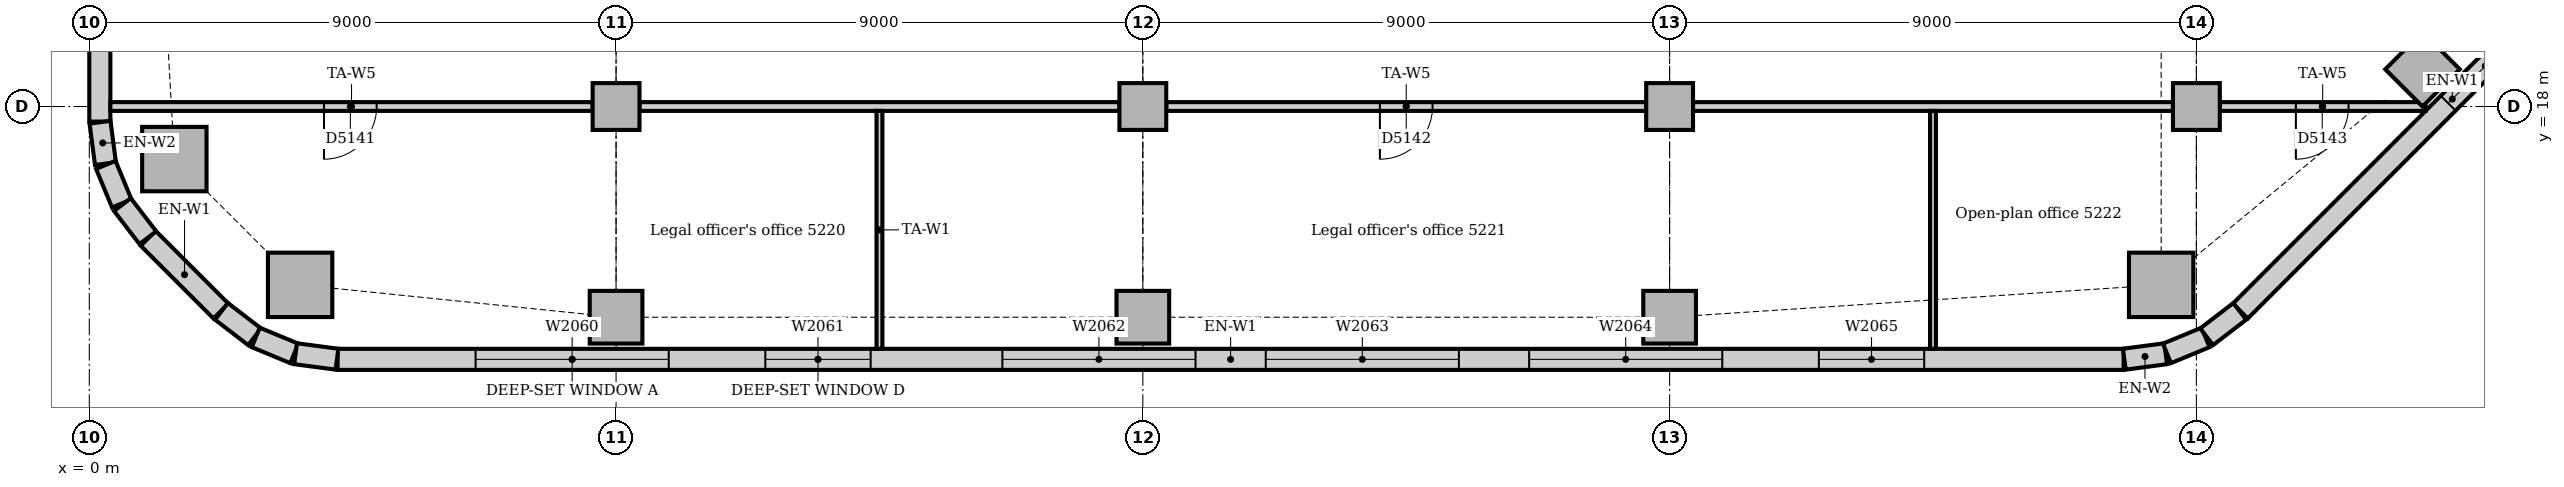
"""IFC4 building model, lengths in metres.
Left out: names, types, materials, properties, quantities, classifications, styles, units other than length and angle.
Written with IfcOpenShell. Run it as: python <this file> out.ifc"""

import sys

from ifc_helpers import new_model, si_unit, direction, frame, frame_2d, origin, origin_2d, place, context, subcontext, project, spatial, rectangle, extrude, element, fill, save


model = new_model("IFC4")
c1 = context("Model", 3, precision=1e-05, world=origin(), true_north=direction((0.0, 1.0)))
c2 = subcontext(c1, "Body", "Model", "MODEL_VIEW")
j1 = project(units=[si_unit("LENGTHUNIT", "METRE"), si_unit("PLANEANGLEUNIT", "RADIAN")], contexts=[c1])
p1 = place(None, origin())
s1 = spatial("IfcSite", under=j1, at=p1, CompositionType="ELEMENT")
p2 = place(p1, origin())
s2 = spatial("IfcBuilding", under=s1, at=p2, CompositionType="ELEMENT")
p3 = place(p2, frame((0.0, 0.0, 218.0)))
s3 = spatial("IfcBuildingStorey", under=s2, at=p3, CompositionType="ELEMENT", Elevation=218.0)
for number, where, z_axis, x_axis in (
    (1, (3.602, 14.953, 0.0), (0.0, 0.0, 1.0), (1.0, 0.0, 0.0)),
    (2, (35.398, 14.953, 0.0), (0.0, 0.0, 1.0), (1.0, 0.0, 0.0)),
    (3, (1.453, 17.102, 0.0), (0.0, 0.0, 1.0), (1.0, 0.0, 0.0)),
):
    element("IfcColumn", number, at=place(p3, frame(where, z_axis=z_axis, x_axis=x_axis)), inside=s3, PredefinedType="COLUMN", context=c2, shape_type="SweptSolid", body=[
        extrude(rectangle(XDim=1.1, YDim=1.1, at=origin_2d()), origin(), (0.0, 0.0, 1.0), 3.85),
    ])
for number, where, z_axis, x_axis in (
    (4, (9.0, 14.4, 0.0), (0.0, 0.0, 1.0), (1.0, 0.0, 0.0)),
    (5, (18.0, 14.4, 0.0), (0.0, 0.0, 1.0), (1.0, 0.0, 0.0)),
    (6, (27.0, 14.4, 0.0), (0.0, 0.0, 1.0), (1.0, 0.0, 0.0)),
    (7, (39.864, 18.636, 0.0), (0.0, 0.0, 1.0), (0.707, 0.707, 0.0)),
):
    element("IfcColumn", number, at=place(p3, frame(where, z_axis=z_axis, x_axis=x_axis)), inside=s3, PredefinedType="COLUMN", context=c2, shape_type="SweptSolid", body=[
        extrude(rectangle(XDim=0.9, YDim=0.9, at=origin_2d()), origin(), (0.0, 0.0, 1.0), 3.85),
    ])
for number, where, z_axis, x_axis in (
    (8, (9.0, 18.0, 0.0), (0.0, 0.0, 1.0), (1.0, 0.0, 0.0)),
    (9, (18.0, 18.0, 0.0), (0.0, 0.0, 1.0), (1.0, 0.0, 0.0)),
    (10, (27.0, 18.0, 0.0), (0.0, 0.0, 1.0), (1.0, 0.0, 0.0)),
    (11, (36.0, 18.0, 0.0), (0.0, 0.0, 1.0), (1.0, 0.0, 0.0)),
):
    element("IfcColumn", number, at=place(p3, frame(where, z_axis=z_axis, x_axis=x_axis)), inside=s3, PredefinedType="COLUMN", context=c2, shape_type="SweptSolid", body=[
        extrude(rectangle(XDim=0.8, YDim=0.8, at=origin_2d()), origin(), (0.0, 0.0, 1.0), 3.85),
    ])
p4 = place(p3, frame((4.243, 13.68, 0.0), z_axis=(0.0, 0.0, 1.0), x_axis=(1.0, 0.0, 0.0)))
e12 = element("IfcWall", 12, at=p4, inside=s3, PredefinedType="STANDARD", context=c2, shape_type="SweptSolid", body=[
    extrude(rectangle(XDim=30.515, YDim=0.36, at=frame_2d((15.257, 0.0))), origin(), (0.0, 0.0, 1.0), 3.85),
])
p5 = place(p4, frame((2.357, 0.0, 0.9)))
e13 = element("IfcOpeningElement", 13, at=p5, cuts=e12, PredefinedType="OPENING", context=c2, shape_type="SweptSolid", body=[
    extrude(rectangle(XDim=3.3, YDim=1.6, at=frame_2d((1.65, 0.8))), frame((0.0, 0.19, 0.0), z_axis=(0.0, -1.0, 0.0), x_axis=(1.0, 0.0, 0.0)), (0.0, 0.0, 1.0), 0.38),
])
p6 = place(p4, frame((7.307, 0.0, 0.9)))
e14 = element("IfcOpeningElement", 14, at=p6, cuts=e12, PredefinedType="OPENING", context=c2, shape_type="SweptSolid", body=[
    extrude(rectangle(XDim=1.8, YDim=1.6, at=frame_2d((0.9, 0.8))), frame((0.0, 0.19, 0.0), z_axis=(0.0, -1.0, 0.0), x_axis=(1.0, 0.0, 0.0)), (0.0, 0.0, 1.0), 0.38),
])
p7 = place(p4, frame((11.357, 0.0, 0.9)))
e15 = element("IfcOpeningElement", 15, at=p7, cuts=e12, PredefinedType="OPENING", context=c2, shape_type="SweptSolid", body=[
    extrude(rectangle(XDim=3.3, YDim=1.6, at=frame_2d((1.65, 0.8))), frame((0.0, 0.19, 0.0), z_axis=(0.0, -1.0, 0.0), x_axis=(1.0, 0.0, 0.0)), (0.0, 0.0, 1.0), 0.38),
])
p8 = place(p4, frame((15.857, 0.0, 0.9)))
e16 = element("IfcOpeningElement", 16, at=p8, cuts=e12, PredefinedType="OPENING", context=c2, shape_type="SweptSolid", body=[
    extrude(rectangle(XDim=3.3, YDim=1.6, at=frame_2d((1.65, 0.8))), frame((0.0, 0.19, 0.0), z_axis=(0.0, -1.0, 0.0), x_axis=(1.0, 0.0, 0.0)), (0.0, 0.0, 1.0), 0.38),
])
p9 = place(p4, frame((20.357, 0.0, 0.9)))
e17 = element("IfcOpeningElement", 17, at=p9, cuts=e12, PredefinedType="OPENING", context=c2, shape_type="SweptSolid", body=[
    extrude(rectangle(XDim=3.3, YDim=1.6, at=frame_2d((1.65, 0.8))), frame((0.0, 0.19, 0.0), z_axis=(0.0, -1.0, 0.0), x_axis=(1.0, 0.0, 0.0)), (0.0, 0.0, 1.0), 0.38),
])
p10 = place(p4, frame((25.307, 0.0, 0.9)))
e18 = element("IfcOpeningElement", 18, at=p10, cuts=e12, PredefinedType="OPENING", context=c2, shape_type="SweptSolid", body=[
    extrude(rectangle(XDim=1.8, YDim=1.6, at=frame_2d((0.9, 0.8))), frame((0.0, 0.19, 0.0), z_axis=(0.0, -1.0, 0.0), x_axis=(1.0, 0.0, 0.0)), (0.0, 0.0, 1.0), 0.38),
])
p11 = place(p3, frame((36.751, 14.506, 0.0), z_axis=(0.0, 0.0, 1.0), x_axis=(0.707106781187, 0.707106781187, 0.0)))
e19 = element("IfcWall", 19, at=p11, inside=s3, PredefinedType="STANDARD", context=c2, shape_type="SweptSolid", body=[
    extrude(rectangle(XDim=10.243, YDim=0.36, at=frame_2d((5.121, 0.0))), origin(), (0.0, 0.0, 1.0), 3.85),
])
p12 = place(p11, frame((5.021, 0.0, 0.9)))
e20 = element("IfcOpeningElement", 20, at=p12, cuts=e19, PredefinedType="OPENING", context=c2, shape_type="SweptSolid", body=[
    extrude(rectangle(XDim=1.8, YDim=1.6, at=frame_2d((0.9, 0.8))), frame((0.0, 0.19, 0.0), z_axis=(0.0, -1.0, 0.0), x_axis=(1.0, 0.0, 0.0)), (0.0, 0.0, 1.0), 0.38),
])
p13 = place(p3, frame((0.18, 21.0, 0.0), z_axis=(0.0, 0.0, 1.0), x_axis=(0.0, -1.0, 0.0)))
e21 = element("IfcWall", 21, at=p13, inside=s3, PredefinedType="STANDARD", context=c2, shape_type="SweptSolid", body=[
    extrude(rectangle(XDim=3.257, YDim=0.36, at=frame_2d((1.629, 0.0))), origin(), (0.0, 0.0, 1.0), 3.85),
])
p14 = place(p3, frame((1.006, 15.749, 0.0), z_axis=(0.0, 0.0, 1.0), x_axis=(0.707106781187, -0.707106781187, 0.0)))
e22 = element("IfcWall", 22, at=p14, inside=s3, PredefinedType="STANDARD", context=c2, shape_type="SweptSolid", body=[
    extrude(rectangle(XDim=1.757, YDim=0.36, at=frame_2d((0.879, 0.0))), origin(), (0.0, 0.0, 1.0), 3.85),
])
for number, where, z_axis, x_axis in (
    (23, (34.769, 13.683, 0.0), (0.0, 0.0, 1.0), (0.991, 0.131, 0.0)),
    (24, (35.497, 13.782, 0.0), (0.0, 0.0, 1.0), (0.924, 0.383, 0.0)),
):
    element("IfcWall", number, at=place(p3, frame(where, z_axis=z_axis, x_axis=x_axis)), inside=s3, PredefinedType="STANDARD", context=c2, shape_type="SweptSolid", body=[
        extrude(rectangle(XDim=0.713, YDim=0.36, at=frame_2d((0.356, 0.0))), origin(), (0.0, 0.0, 1.0), 3.85),
    ])
p15 = place(p3, frame((36.175, 14.066, 0.0), z_axis=(0.0, 0.0, 1.0), x_axis=(0.793321924995, 0.608802368033, 0.0)))
e25 = element("IfcWall", 25, at=p15, inside=s3, PredefinedType="STANDARD", context=c2, shape_type="SweptSolid", body=[
    extrude(rectangle(XDim=0.713, YDim=0.36, at=frame_2d((0.357, 0.0))), origin(), (0.0, 0.0, 1.0), 3.85),
])
for number, where, z_axis, x_axis in (
    (26, (0.183, 17.731, 0.0), (0.0, 0.0, 1.0), (0.131, -0.991, 0.0)),
    (27, (0.282, 17.003, 0.0), (0.0, 0.0, 1.0), (0.383, -0.924, 0.0)),
):
    element("IfcWall", number, at=place(p3, frame(where, z_axis=z_axis, x_axis=x_axis)), inside=s3, PredefinedType="STANDARD", context=c2, shape_type="SweptSolid", body=[
        extrude(rectangle(XDim=0.713, YDim=0.36, at=frame_2d((0.356, 0.0))), origin(), (0.0, 0.0, 1.0), 3.85),
    ])
for number, where, z_axis, x_axis in (
    (28, (0.566, 16.325, 0.0), (0.0, 0.0, 1.0), (0.609, -0.793, 0.0)),
    (29, (2.259, 14.5, 0.0), (0.0, 0.0, 1.0), (0.793, -0.609, 0.0)),
):
    element("IfcWall", number, at=place(p3, frame(where, z_axis=z_axis, x_axis=x_axis)), inside=s3, PredefinedType="STANDARD", context=c2, shape_type="SweptSolid", body=[
        extrude(rectangle(XDim=0.713, YDim=0.36, at=frame_2d((0.357, 0.0))), origin(), (0.0, 0.0, 1.0), 3.85),
    ])
for number, where, z_axis, x_axis in (
    (30, (2.844, 14.055, 0.0), (0.0, 0.0, 1.0), (0.924, -0.383, 0.0)),
    (31, (3.524, 13.776, 0.0), (0.0, 0.0, 1.0), (0.991, -0.131, 0.0)),
):
    element("IfcWall", number, at=place(p3, frame(where, z_axis=z_axis, x_axis=x_axis)), inside=s3, PredefinedType="STANDARD", context=c2, shape_type="SweptSolid", body=[
        extrude(rectangle(XDim=0.713, YDim=0.36, at=frame_2d((0.356, 0.0))), origin(), (0.0, 0.0, 1.0), 3.85),
    ])
p16 = place(p3, frame((36.4, 18.0, 0.0), z_axis=(0.0, 0.0, 1.0), x_axis=(1.0, 0.0, 0.0)))
e32 = element("IfcWall", 32, at=p16, inside=s3, PredefinedType="PARTITIONING", context=c2, shape_type="SweptSolid", body=[
    extrude(rectangle(XDim=3.516, YDim=0.15, at=frame_2d((1.758, 0.0))), origin(), (0.0, 0.0, 1.0), 3.602),
])
p17 = place(p16, frame((1.3, 0.0, 0.0)))
e33 = element("IfcOpeningElement", 33, at=p17, cuts=e32, PredefinedType="OPENING", context=c2, shape_type="SweptSolid", body=[
    extrude(rectangle(XDim=0.9, YDim=2.1, at=frame_2d((0.45, 1.05))), frame((0.0, 0.085, 0.0), z_axis=(0.0, -1.0, 0.0), x_axis=(1.0, 0.0, 0.0)), (0.0, 0.0, 1.0), 0.17),
])
p18 = place(p3, frame((27.4, 18.0, 0.0), z_axis=(0.0, 0.0, 1.0), x_axis=(1.0, 0.0, 0.0)))
e34 = element("IfcWall", 34, at=p18, inside=s3, PredefinedType="PARTITIONING", context=c2, shape_type="SweptSolid", body=[
    extrude(rectangle(XDim=8.2, YDim=0.15, at=frame_2d((4.1, 0.0))), origin(), (0.0, 0.0, 1.0), 3.254),
])
p19 = place(p3, frame((18.4, 18.0, 0.0), z_axis=(0.0, 0.0, 1.0), x_axis=(1.0, 0.0, 0.0)))
e35 = element("IfcWall", 35, at=p19, inside=s3, PredefinedType="PARTITIONING", context=c2, shape_type="SweptSolid", body=[
    extrude(rectangle(XDim=8.2, YDim=0.15, at=frame_2d((4.1, 0.0))), origin(), (0.0, 0.0, 1.0), 3.254),
])
p20 = place(p19, frame((3.65, 0.0, 0.0)))
e36 = element("IfcOpeningElement", 36, at=p20, cuts=e35, PredefinedType="OPENING", context=c2, shape_type="SweptSolid", body=[
    extrude(rectangle(XDim=0.9, YDim=2.1, at=frame_2d((0.45, 1.05))), frame((0.0, 0.085, 0.0), z_axis=(0.0, -1.0, 0.0), x_axis=(1.0, 0.0, 0.0)), (0.0, 0.0, 1.0), 0.17),
])
p21 = place(p3, frame((9.4, 18.0, 0.0), z_axis=(0.0, 0.0, 1.0), x_axis=(1.0, 0.0, 0.0)))
e37 = element("IfcWall", 37, at=p21, inside=s3, PredefinedType="PARTITIONING", context=c2, shape_type="SweptSolid", body=[
    extrude(rectangle(XDim=8.2, YDim=0.15, at=frame_2d((4.1, 0.0))), origin(), (0.0, 0.0, 1.0), 3.254),
])
p22 = place(p3, frame((0.36, 18.0, 0.0), z_axis=(0.0, 0.0, 1.0), x_axis=(1.0, 0.0, 0.0)))
e38 = element("IfcWall", 38, at=p22, inside=s3, PredefinedType="PARTITIONING", context=c2, shape_type="SweptSolid", body=[
    extrude(rectangle(XDim=8.24, YDim=0.15, at=frame_2d((4.12, 0.0))), origin(), (0.0, 0.0, 1.0), 3.254),
])
p23 = place(p22, frame((3.65, 0.0, 0.0)))
e39 = element("IfcOpeningElement", 39, at=p23, cuts=e38, PredefinedType="OPENING", context=c2, shape_type="SweptSolid", body=[
    extrude(rectangle(XDim=0.9, YDim=2.1, at=frame_2d((0.45, 1.05))), frame((0.0, 0.085, 0.0), z_axis=(0.0, -1.0, 0.0), x_axis=(1.0, 0.0, 0.0)), (0.0, 0.0, 1.0), 0.17),
])
for number, where, z_axis, x_axis in (
    (40, (13.5, 13.86, 0.0), (0.0, 0.0, 1.0), (0.0, 1.0, 0.0)),
    (41, (31.5, 13.86, 0.0), (0.0, 0.0, 1.0), (0.0, 1.0, 0.0)),
):
    element("IfcWall", number, at=place(p3, frame(where, z_axis=z_axis, x_axis=x_axis)), inside=s3, PredefinedType="PARTITIONING", context=c2, shape_type="SweptSolid", body=[
        extrude(rectangle(XDim=4.065, YDim=0.1, at=frame_2d((2.033, 0.0))), origin(), (0.0, 0.0, 1.0), 3.85),
    ])
p24 = place(p5, origin())
e42 = element("IfcWindow", 42, at=p24, inside=s3, PartitioningType="SINGLE_PANEL", PredefinedType="WINDOW", context=c2, shape_type="SweptSolid", body=[
    extrude(rectangle(XDim=3.3, YDim=1.6, at=frame_2d((1.65, 0.8))), frame((0.0, 0.13, 0.0), z_axis=(0.0, -1.0, 0.0), x_axis=(1.0, 0.0, 0.0)), (0.0, 0.0, 1.0), 0.06),
])
fill(e13, e42)
p25 = place(p6, origin())
e43 = element("IfcWindow", 43, at=p25, inside=s3, PartitioningType="SINGLE_PANEL", PredefinedType="WINDOW", context=c2, shape_type="SweptSolid", body=[
    extrude(rectangle(XDim=1.8, YDim=1.6, at=frame_2d((0.9, 0.8))), frame((0.0, 0.13, 0.0), z_axis=(0.0, -1.0, 0.0), x_axis=(1.0, 0.0, 0.0)), (0.0, 0.0, 1.0), 0.06),
])
fill(e14, e43)
p26 = place(p7, origin())
e44 = element("IfcWindow", 44, at=p26, inside=s3, PartitioningType="SINGLE_PANEL", PredefinedType="WINDOW", context=c2, shape_type="SweptSolid", body=[
    extrude(rectangle(XDim=3.3, YDim=1.6, at=frame_2d((1.65, 0.8))), frame((0.0, 0.13, 0.0), z_axis=(0.0, -1.0, 0.0), x_axis=(1.0, 0.0, 0.0)), (0.0, 0.0, 1.0), 0.06),
])
fill(e15, e44)
p27 = place(p8, origin())
e45 = element("IfcWindow", 45, at=p27, inside=s3, PartitioningType="SINGLE_PANEL", PredefinedType="WINDOW", context=c2, shape_type="SweptSolid", body=[
    extrude(rectangle(XDim=3.3, YDim=1.6, at=frame_2d((1.65, 0.8))), frame((0.0, 0.13, 0.0), z_axis=(0.0, -1.0, 0.0), x_axis=(1.0, 0.0, 0.0)), (0.0, 0.0, 1.0), 0.06),
])
fill(e16, e45)
p28 = place(p9, origin())
e46 = element("IfcWindow", 46, at=p28, inside=s3, PartitioningType="SINGLE_PANEL", PredefinedType="WINDOW", context=c2, shape_type="SweptSolid", body=[
    extrude(rectangle(XDim=3.3, YDim=1.6, at=frame_2d((1.65, 0.8))), frame((0.0, 0.13, 0.0), z_axis=(0.0, -1.0, 0.0), x_axis=(1.0, 0.0, 0.0)), (0.0, 0.0, 1.0), 0.06),
])
fill(e17, e46)
p29 = place(p10, origin())
e47 = element("IfcWindow", 47, at=p29, inside=s3, PartitioningType="SINGLE_PANEL", PredefinedType="WINDOW", context=c2, shape_type="SweptSolid", body=[
    extrude(rectangle(XDim=1.8, YDim=1.6, at=frame_2d((0.9, 0.8))), frame((0.0, 0.13, 0.0), z_axis=(0.0, -1.0, 0.0), x_axis=(1.0, 0.0, 0.0)), (0.0, 0.0, 1.0), 0.06),
])
fill(e18, e47)
p30 = place(p12, origin())
e48 = element("IfcWindow", 48, at=p30, inside=s3, PartitioningType="SINGLE_PANEL", PredefinedType="WINDOW", context=c2, shape_type="SweptSolid", body=[
    extrude(rectangle(XDim=1.8, YDim=1.6, at=frame_2d((0.9, 0.8))), frame((0.0, 0.13, 0.0), z_axis=(0.0, -1.0, 0.0), x_axis=(1.0, 0.0, 0.0)), (0.0, 0.0, 1.0), 0.06),
])
fill(e20, e48)
p31 = place(p23, frame((0.9, 0.0, 0.0), z_axis=(0.0, 0.0, 1.0), x_axis=(-1.0, 0.0, 0.0)))
e49 = element("IfcDoor", 49, at=p31, inside=s3, OperationType="SINGLE_SWING_RIGHT", PredefinedType="DOOR", context=c2, shape_type="SweptSolid", body=[
    extrude(rectangle(XDim=0.9, YDim=2.1, at=frame_2d((0.45, 1.05))), frame((0.0, 0.025, 0.0), z_axis=(0.0, -1.0, 0.0), x_axis=(1.0, 0.0, 0.0)), (0.0, 0.0, 1.0), 0.05),
])
fill(e39, e49)
p32 = place(p20, frame((0.9, 0.0, 0.0), z_axis=(0.0, 0.0, 1.0), x_axis=(-1.0, 0.0, 0.0)))
e50 = element("IfcDoor", 50, at=p32, inside=s3, OperationType="SINGLE_SWING_RIGHT", PredefinedType="DOOR", context=c2, shape_type="SweptSolid", body=[
    extrude(rectangle(XDim=0.9, YDim=2.1, at=frame_2d((0.45, 1.05))), frame((0.0, 0.025, 0.0), z_axis=(0.0, -1.0, 0.0), x_axis=(1.0, 0.0, 0.0)), (0.0, 0.0, 1.0), 0.05),
])
fill(e36, e50)
p33 = place(p17, frame((0.9, 0.0, 0.0), z_axis=(0.0, 0.0, 1.0), x_axis=(-1.0, 0.0, 0.0)))
e51 = element("IfcDoor", 51, at=p33, inside=s3, OperationType="SINGLE_SWING_RIGHT", PredefinedType="DOOR", context=c2, shape_type="SweptSolid", body=[
    extrude(rectangle(XDim=0.9, YDim=2.1, at=frame_2d((0.45, 1.05))), frame((0.0, 0.025, 0.0), z_axis=(0.0, -1.0, 0.0), x_axis=(1.0, 0.0, 0.0)), (0.0, 0.0, 1.0), 0.05),
])
fill(e33, e51)
save(model, sys.argv[1])
